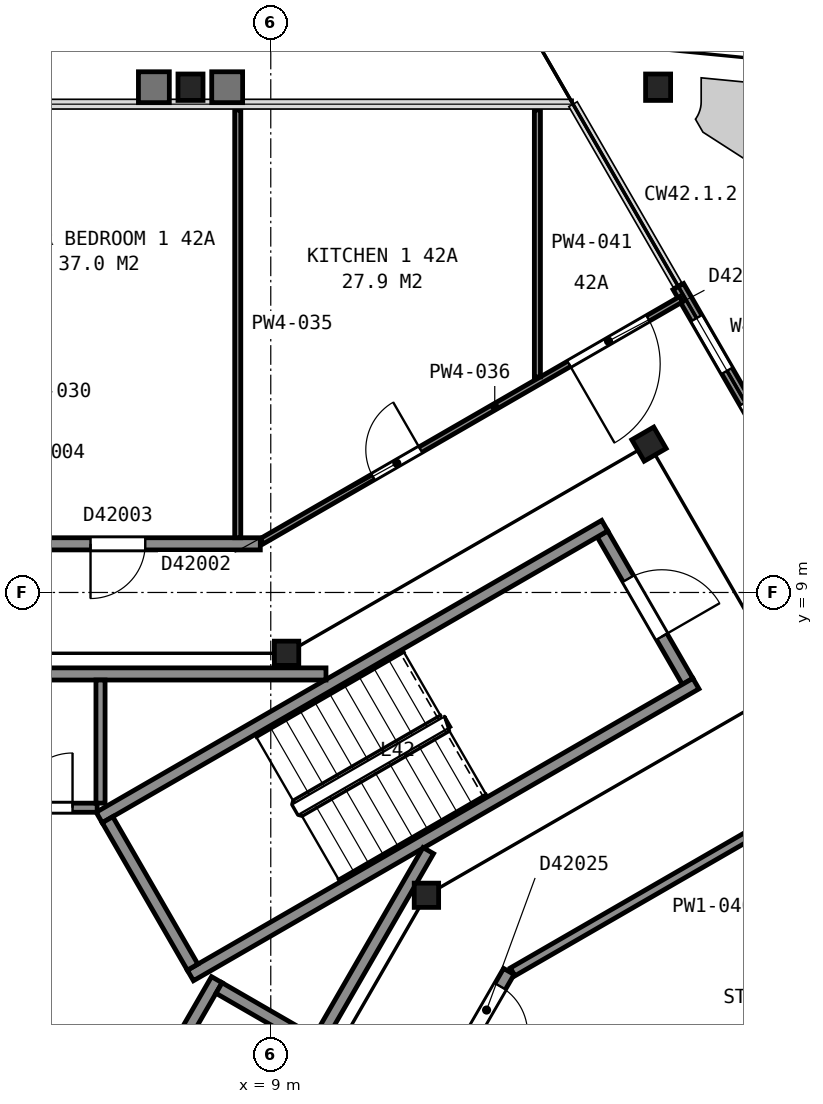
"""IFC4 building model, lengths in metres.
Left out: names, types, materials, properties, quantities, classifications, styles, units other than length and angle.
Written with IfcOpenShell. Run it as: python <this file> out.ifc"""

import sys

from ifc_helpers import new_model, si_unit, direction, frame, frame_2d, origin, origin_2d, place, context, subcontext, project, spatial, rectangle, i_section, extrude, element, fill, save


model = new_model("IFC4")
c1 = context("Model", 3, precision=1e-05, world=origin(), true_north=direction((0.0, 1.0)))
c2 = subcontext(c1, "Body", "Model", "MODEL_VIEW")
j1 = project(units=[si_unit("LENGTHUNIT", "METRE"), si_unit("PLANEANGLEUNIT", "RADIAN")], contexts=[c1])
p1 = place(None, origin())
s1 = spatial("IfcSite", under=j1, at=p1, CompositionType="ELEMENT")
p2 = place(p1, origin())
s2 = spatial("IfcBuilding", under=s1, at=p2, CompositionType="ELEMENT")
p3 = place(p2, frame((0.0, 0.0, 171.0)))
s3 = spatial("IfcBuildingStorey", under=s2, at=p3, CompositionType="ELEMENT", Elevation=171.0)
p4 = place(p3, frame((15.37, 17.31, 0.0), z_axis=(0.0, 0.0, 1.0), x_axis=(1.0, 0.0, 0.0)))
e1 = element("IfcColumn", 1, at=p4, inside=s3, PredefinedType="COLUMN", context=c2, shape_type="SweptSolid", body=[
    extrude(i_section(OverallWidth=0.411, OverallDepth=0.434, WebThickness=0.036, FlangeThickness=0.057, FilletRadius=0.015, at=origin_2d()), origin(), (0.0, 0.0, 1.0), 3.66),
])
p5 = place(p3, frame((7.68, 17.31, 0.0), z_axis=(0.0, 0.0, 1.0), x_axis=(1.0, 0.0, 0.0)))
e2 = element("IfcColumn", 2, at=p5, inside=s3, PredefinedType="COLUMN", context=c2, shape_type="SweptSolid", body=[
    extrude(i_section(OverallWidth=0.411, OverallDepth=0.434, WebThickness=0.036, FlangeThickness=0.057, FilletRadius=0.015, at=origin_2d()), origin(), (0.0, 0.0, 1.0), 3.665),
])
p6 = place(p3, frame((11.56, 4.02, 0.0), z_axis=(0.0, 0.0, 1.0), x_axis=(1.0, 0.0, 0.0)))
e3 = element("IfcColumn", 3, at=p6, inside=s3, PredefinedType="COLUMN", context=c2, shape_type="SweptSolid", body=[
    extrude(i_section(OverallWidth=0.401, OverallDepth=0.399, WebThickness=0.025, FlangeThickness=0.04, FilletRadius=0.015, at=origin_2d()), origin(), (0.0, 0.0, 1.0), 3.7),
])
p7 = place(p3, frame((15.22, 11.44, 0.0), z_axis=(0.0, 0.0, 1.0), x_axis=(0.5, -0.866025403784, 0.0)))
e4 = element("IfcColumn", 4, at=p7, inside=s3, PredefinedType="COLUMN", context=c2, shape_type="SweptSolid", body=[
    extrude(i_section(OverallWidth=0.406, OverallDepth=0.417, WebThickness=0.03, FlangeThickness=0.048, FilletRadius=0.015, at=origin_2d()), origin(), (0.0, 0.0, 1.0), 3.7),
])
p8 = place(p3, frame((9.26, 8.0, 0.0), z_axis=(0.0, 0.0, 1.0), x_axis=(1.0, 0.0, 0.0)))
e5 = element("IfcColumn", 5, at=p8, inside=s3, PredefinedType="COLUMN", context=c2, shape_type="SweptSolid", body=[
    extrude(i_section(OverallWidth=0.401, OverallDepth=0.399, WebThickness=0.025, FlangeThickness=0.04, FilletRadius=0.015, at=origin_2d()), origin(), (0.0, 0.0, 1.0), 3.7),
])
p9 = place(p3, frame((20.003, 6.583, 0.0), z_axis=(0.0, 0.0, 1.0), x_axis=(-0.499995216735, 0.866028165386, 0.0)))
e6 = element("IfcWall", 6, at=p9, inside=s3, PredefinedType="SOLIDWALL", context=c2, shape_type="SweptSolid", body=[
    extrude(rectangle(XDim=8.6, YDim=0.2, at=frame_2d((4.3, 0.0))), origin(), (0.0, 0.0, 1.0), 2.713),
])
p10 = place(p9, frame((0.6, 0.0, 0.9)))
e7 = element("IfcOpeningElement", 7, at=p10, cuts=e6, PredefinedType="OPENING", context=c2, shape_type="SweptSolid", body=[
    extrude(rectangle(XDim=1.0, YDim=1.5, at=frame_2d((0.5, 0.75))), frame((0.0, 0.11, 0.0), z_axis=(0.0, -1.0, 0.0), x_axis=(1.0, 0.0, 0.0)), (0.0, 0.0, 1.0), 0.22),
])
p11 = place(p9, frame((2.2, 0.0, 0.0)))
e8 = element("IfcOpeningElement", 8, at=p11, cuts=e6, PredefinedType="OPENING", context=c2, shape_type="SweptSolid", body=[
    extrude(rectangle(XDim=1.8, YDim=2.4, at=frame_2d((0.9, 1.2))), frame((0.0, 0.11, 0.0), z_axis=(0.0, -1.0, 0.0), x_axis=(1.0, 0.0, 0.0)), (0.0, 0.0, 1.0), 0.22),
])
p12 = place(p9, frame((4.6, 0.0, 0.0)))
e9 = element("IfcOpeningElement", 9, at=p12, cuts=e6, PredefinedType="OPENING", context=c2, shape_type="SweptSolid", body=[
    extrude(rectangle(XDim=1.8, YDim=2.4, at=frame_2d((0.9, 1.2))), frame((0.0, 0.11, 0.0), z_axis=(0.0, -1.0, 0.0), x_axis=(1.0, 0.0, 0.0)), (0.0, 0.0, 1.0), 0.22),
])
p13 = place(p9, frame((7.0, 0.0, 0.9)))
e10 = element("IfcOpeningElement", 10, at=p13, cuts=e6, PredefinedType="OPENING", context=c2, shape_type="SweptSolid", body=[
    extrude(rectangle(XDim=1.0, YDim=1.5, at=frame_2d((0.5, 0.75))), frame((0.0, 0.11, 0.0), z_axis=(0.0, -1.0, 0.0), x_axis=(1.0, 0.0, 0.0)), (0.0, 0.0, 1.0), 0.22),
])
p14 = place(p3, frame((15.855, 7.538, 0.0), z_axis=(0.0, 0.0, 1.0), x_axis=(-0.500049511043, 0.865996816683, 0.0)))
e11 = element("IfcWall", 11, at=p14, inside=s3, PredefinedType="PARTITIONING", context=c2, shape_type="SweptSolid", body=[
    extrude(rectangle(XDim=2.8, YDim=0.2, at=frame_2d((1.4, 0.0))), origin(), (0.0, 0.0, 1.0), 3.45),
])
p15 = place(p14, frame((0.85, 0.0, 0.0)))
e12 = element("IfcOpeningElement", 12, at=p15, cuts=e11, PredefinedType="OPENING", context=c2, shape_type="SweptSolid", body=[
    extrude(rectangle(XDim=1.1, YDim=2.1, at=frame_2d((0.55, 1.05))), frame((0.0, 0.11, 0.0), z_axis=(0.0, -1.0, 0.0), x_axis=(1.0, 0.0, 0.0)), (0.0, 0.0, 1.0), 0.22),
])
for number, where, z_axis, x_axis in (
    (13, (6.178, 5.299, 0.0), (0.0, 0.0, 1.0), (0.866, 0.5, 0.0)),
    (14, (7.678, 2.701, 0.0), (0.0, 0.0, 1.0), (0.866, 0.5, 0.0)),
):
    element("IfcWall", number, at=place(p3, frame(where, z_axis=z_axis, x_axis=x_axis)), inside=s3, PredefinedType="PARTITIONING", context=c2, shape_type="SweptSolid", body=[
        extrude(rectangle(XDim=9.6, YDim=0.2, at=frame_2d((4.8, 0.0))), origin(), (0.0, 0.0, 1.0), 3.45),
    ])
p16 = place(p3, frame((7.715, 2.838, 0.0), z_axis=(0.0, 0.0, 1.0), x_axis=(-0.500049511043, 0.865996816683, 0.0)))
e15 = element("IfcWall", 15, at=p16, inside=s3, PredefinedType="PARTITIONING", context=c2, shape_type="SweptSolid", body=[
    extrude(rectangle(XDim=2.8, YDim=0.2, at=frame_2d((1.4, 0.0))), origin(), (0.0, 0.0, 1.0), 3.45),
])
p17 = place(p3, frame((5.663, -1.612, 0.0), z_axis=(0.0, 0.0, 1.0), x_axis=(0.49998122708, 0.866036242063, 0.0)))
e16 = element("IfcWall", 16, at=p17, inside=s3, PredefinedType="PARTITIONING", context=c2, shape_type="SweptSolid", body=[
    extrude(rectangle(XDim=4.9, YDim=0.2, at=frame_2d((2.45, 0.0))), origin(), (0.0, 0.0, 1.0), 3.7),
])
p18 = place(p3, frame((9.665, 1.62, 0.0), z_axis=(0.0, 0.0, 1.0), x_axis=(-0.866002029911, 0.500040482552, 0.0)))
e17 = element("IfcWall", 17, at=p18, inside=s3, PredefinedType="PARTITIONING", context=c2, shape_type="SweptSolid", body=[
    extrude(rectangle(XDim=1.75, YDim=0.2, at=frame_2d((0.875, 0.0))), origin(), (0.0, 0.0, 1.0), 3.7),
])
p19 = place(p3, frame((-3.933, 7.66, 0.0), z_axis=(0.0, 0.0, 1.0), x_axis=(1.0, 0.0, 0.0)))
e18 = element("IfcWall", 18, at=p19, inside=s3, PredefinedType="PARTITIONING", context=c2, shape_type="SweptSolid", body=[
    extrude(rectangle(XDim=13.841, YDim=0.2, at=frame_2d((6.92, 0.0))), origin(), (0.0, 0.0, 1.0), 3.45),
])
p20 = place(p3, frame((0.925, 5.46, 0.0), z_axis=(0.0, 0.0, 1.0), x_axis=(1.0, 0.0, 0.0)))
e19 = element("IfcWall", 19, at=p20, inside=s3, PredefinedType="PARTITIONING", context=c2, shape_type="SweptSolid", body=[
    extrude(rectangle(XDim=5.22, YDim=0.15, at=frame_2d((2.61, 0.0))), origin(), (0.0, 0.0, 1.0), 3.45),
])
p21 = place(p20, frame((3.915, 0.0, 0.0)))
e20 = element("IfcOpeningElement", 20, at=p21, cuts=e19, PredefinedType="OPENING", context=c2, shape_type="SweptSolid", body=[
    extrude(rectangle(XDim=0.9, YDim=2.1, at=frame_2d((0.45, 1.05))), frame((0.0, 0.085, 0.0), z_axis=(0.0, -1.0, 0.0), x_axis=(1.0, 0.0, 0.0)), (0.0, 0.0, 1.0), 0.17),
])
p22 = place(p3, frame((6.2, 5.535, 0.0), z_axis=(0.0, 0.0, 1.0), x_axis=(0.0, 1.0, 0.0)))
e21 = element("IfcWall", 21, at=p22, inside=s3, PredefinedType="PARTITIONING", context=c2, shape_type="SweptSolid", body=[
    extrude(rectangle(XDim=2.025, YDim=0.15, at=frame_2d((1.013, 0.0))), origin(), (0.0, 0.0, 1.0), 3.45),
])
p23 = place(p3, frame((9.803, 1.658, 0.0), z_axis=(0.0, 0.0, 1.0), x_axis=(0.499943114462, 0.866058244174, 0.0)))
e22 = element("IfcWall", 22, at=p23, inside=s3, PredefinedType="PARTITIONING", context=c2, shape_type="SweptSolid", body=[
    extrude(rectangle(XDim=3.576, YDim=0.2, at=frame_2d((1.788, 0.0))), origin(), (0.0, 0.0, 1.0), 3.45),
])
p24 = place(p3, frame((-8.828, 9.8, 0.0), z_axis=(0.0, 0.0, 1.0), x_axis=(1.0, 0.0, 0.0)))
e23 = element("IfcWall", 23, at=p24, inside=s3, PredefinedType="PARTITIONING", context=c2, shape_type="SweptSolid", body=[
    extrude(rectangle(XDim=17.656, YDim=0.2, at=frame_2d((8.828, 0.0))), origin(), (0.0, 0.0, 1.0), 2.713),
])
p25 = place(p24, frame((14.864, 0.0, 0.0)))
e24 = element("IfcOpeningElement", 24, at=p25, cuts=e23, PredefinedType="OPENING", context=c2, shape_type="SweptSolid", body=[
    extrude(rectangle(XDim=0.9, YDim=2.1, at=frame_2d((0.45, 1.05))), frame((0.0, 0.11, 0.0), z_axis=(0.0, -1.0, 0.0), x_axis=(1.0, 0.0, 0.0)), (0.0, 0.0, 1.0), 0.22),
])
p26 = place(p24, frame((6.488, 0.0, 0.0)))
e25 = element("IfcOpeningElement", 25, at=p26, cuts=e23, PredefinedType="OPENING", context=c2, shape_type="SweptSolid", body=[
    extrude(rectangle(XDim=0.9, YDim=2.1, at=frame_2d((0.45, 1.05))), frame((0.0, 0.11, 0.0), z_axis=(0.0, -1.0, 0.0), x_axis=(1.0, 0.0, 0.0)), (0.0, 0.0, 1.0), 0.22),
])
p27 = place(p24, frame((2.2, 0.0, 0.0)))
e26 = element("IfcOpeningElement", 26, at=p27, cuts=e23, PredefinedType="OPENING", context=c2, shape_type="SweptSolid", body=[
    extrude(rectangle(XDim=0.9, YDim=2.1, at=frame_2d((0.45, 1.05))), frame((0.0, 0.11, 0.0), z_axis=(0.0, -1.0, 0.0), x_axis=(1.0, 0.0, 0.0)), (0.0, 0.0, 1.0), 0.22),
])
p28 = place(p3, frame((12.916, 2.767, 0.0), z_axis=(0.0, 0.0, 1.0), x_axis=(-0.499999767326, -0.866025538119, 0.0)))
e27 = element("IfcWall", 27, at=p28, inside=s3, PredefinedType="PARTITIONING", context=c2, shape_type="SweptSolid", body=[
    extrude(rectangle(XDim=17.731, YDim=0.2, at=frame_2d((8.865, 0.0))), origin(), (0.0, 0.0, 1.0), 2.713),
])
p29 = place(p28, frame((14.293, 0.0, 0.0)))
e28 = element("IfcOpeningElement", 28, at=p29, cuts=e27, PredefinedType="OPENING", context=c2, shape_type="SweptSolid", body=[
    extrude(rectangle(XDim=0.9, YDim=2.1, at=frame_2d((0.45, 1.05))), frame((0.0, 0.11, 0.0), z_axis=(0.0, -1.0, 0.0), x_axis=(1.0, 0.0, 0.0)), (0.0, 0.0, 1.0), 0.22),
])
p30 = place(p28, frame((10.622, 0.0, 0.0)))
e29 = element("IfcOpeningElement", 29, at=p30, cuts=e27, PredefinedType="OPENING", context=c2, shape_type="SweptSolid", body=[
    extrude(rectangle(XDim=0.9, YDim=2.1, at=frame_2d((0.45, 1.05))), frame((0.0, 0.11, 0.0), z_axis=(0.0, -1.0, 0.0), x_axis=(1.0, 0.0, 0.0)), (0.0, 0.0, 1.0), 0.22),
])
p31 = place(p28, frame((3.897, 0.0, 0.0)))
e30 = element("IfcOpeningElement", 30, at=p31, cuts=e27, PredefinedType="OPENING", context=c2, shape_type="SweptSolid", body=[
    extrude(rectangle(XDim=0.9, YDim=2.1, at=frame_2d((0.45, 1.05))), frame((0.0, 0.11, 0.0), z_axis=(0.0, -1.0, 0.0), x_axis=(1.0, 0.0, 0.0)), (0.0, 0.0, 1.0), 0.22),
])
p32 = place(p28, frame((0.283, 0.0, 0.0)))
e31 = element("IfcOpeningElement", 31, at=p32, cuts=e27, PredefinedType="OPENING", context=c2, shape_type="SweptSolid", body=[
    extrude(rectangle(XDim=0.9, YDim=2.1, at=frame_2d((0.45, 1.05))), frame((0.0, 0.11, 0.0), z_axis=(0.0, -1.0, 0.0), x_axis=(1.0, 0.0, 0.0)), (0.0, 0.0, 1.0), 0.22),
])
p33 = place(p3, frame((8.457, 9.9, 0.0), z_axis=(0.0, 0.0, 1.0), x_axis=(0.0, 1.0, 0.0)))
e32 = element("IfcWall", 32, at=p33, inside=s3, PredefinedType="PARTITIONING", context=c2, shape_type="SweptSolid", body=[
    extrude(rectangle(XDim=7.035, YDim=0.1, at=frame_2d((3.518, 0.0))), origin(), (0.0, 0.0, 1.0), 2.713),
])
p34 = place(p3, frame((8.852, 9.843, 0.0), z_axis=(0.0, 0.0, 1.0), x_axis=(0.866086037714, 0.499894964244, 0.0)))
e33 = element("IfcWall", 33, at=p34, inside=s3, PredefinedType="PARTITIONING", context=c2, shape_type="SweptSolid", body=[
    extrude(rectangle(XDim=7.963, YDim=0.1, at=frame_2d((3.981, 0.0))), origin(), (0.0, 0.0, 1.0), 2.713),
])
p35 = place(p34, frame((5.834, 0.0, 0.0)))
e34 = element("IfcOpeningElement", 34, at=p35, cuts=e33, PredefinedType="OPENING", context=c2, shape_type="SweptSolid", body=[
    extrude(rectangle(XDim=1.5, YDim=2.1, at=frame_2d((0.75, 1.05))), frame((0.0, 0.06, 0.0), z_axis=(0.0, -1.0, 0.0), x_axis=(1.0, 0.0, 0.0)), (0.0, 0.0, 1.0), 0.12),
])
p36 = place(p34, frame((2.115, 0.0, 0.0)))
e35 = element("IfcOpeningElement", 35, at=p36, cuts=e33, PredefinedType="OPENING", context=c2, shape_type="SweptSolid", body=[
    extrude(rectangle(XDim=0.9, YDim=2.1, at=frame_2d((0.45, 1.05))), frame((0.0, 0.06, 0.0), z_axis=(0.0, -1.0, 0.0), x_axis=(1.0, 0.0, 0.0)), (0.0, 0.0, 1.0), 0.12),
])
p37 = place(p3, frame((19.847, 6.725, 0.0), z_axis=(0.0, 0.0, 1.0), x_axis=(-0.866069747624, -0.499923186351, 0.0)))
e36 = element("IfcWall", 36, at=p37, inside=s3, PredefinedType="PARTITIONING", context=c2, shape_type="SweptSolid", body=[
    extrude(rectangle(XDim=7.931, YDim=0.15, at=frame_2d((3.966, 0.0))), origin(), (0.0, 0.0, 1.0), 2.713),
])
p38 = place(p37, frame((0.928, 0.0, 0.0)))
e37 = element("IfcOpeningElement", 37, at=p38, cuts=e36, PredefinedType="OPENING", context=c2, shape_type="SweptSolid", body=[
    extrude(rectangle(XDim=1.0, YDim=2.1, at=frame_2d((0.5, 1.05))), frame((0.0, 0.085, 0.0), z_axis=(0.0, -1.0, 0.0), x_axis=(1.0, 0.0, 0.0)), (0.0, 0.0, 1.0), 0.17),
])
p39 = place(p3, frame((13.385, 12.546, 0.0), z_axis=(0.0, 0.0, 1.0), x_axis=(0.0, 1.0, 0.0)))
e38 = element("IfcWall", 38, at=p39, inside=s3, PredefinedType="PARTITIONING", context=c2, shape_type="SweptSolid", body=[
    extrude(rectangle(XDim=4.389, YDim=0.1, at=frame_2d((2.195, 0.0))), origin(), (0.0, 0.0, 1.0), 2.713),
])
p40 = place(p13, origin())
e39 = element("IfcWindow", 39, at=p40, inside=s3, PartitioningType="SINGLE_PANEL", PredefinedType="WINDOW", context=c2, shape_type="SweptSolid", body=[
    extrude(rectangle(XDim=1.0, YDim=1.5, at=frame_2d((0.5, 0.75))), frame((0.0, 0.03, 0.0), z_axis=(0.0, -1.0, 0.0), x_axis=(1.0, 0.0, 0.0)), (0.0, 0.0, 1.0), 0.06),
])
fill(e10, e39)
p41 = place(p15, origin())
e40 = element("IfcDoor", 40, at=p41, inside=s3, OperationType="SINGLE_SWING_LEFT", PredefinedType="DOOR", context=c2, shape_type="SweptSolid", body=[
    extrude(rectangle(XDim=1.1, YDim=2.1, at=frame_2d((0.55, 1.05))), frame((0.0, 0.025, 0.0), z_axis=(0.0, -1.0, 0.0), x_axis=(1.0, 0.0, 0.0)), (0.0, 0.0, 1.0), 0.05),
])
fill(e12, e40)
p42 = place(p21, origin())
e41 = element("IfcDoor", 41, at=p42, inside=s3, OperationType="SINGLE_SWING_RIGHT", PredefinedType="DOOR", context=c2, shape_type="SweptSolid", body=[
    extrude(rectangle(XDim=0.9, YDim=2.1, at=frame_2d((0.45, 1.05))), frame((0.0, 0.025, 0.0), z_axis=(0.0, -1.0, 0.0), x_axis=(1.0, 0.0, 0.0)), (0.0, 0.0, 1.0), 0.05),
])
fill(e20, e41)
p43 = place(p25, origin())
e42 = element("IfcDoor", 42, at=p43, inside=s3, OperationType="SINGLE_SWING_LEFT", PredefinedType="DOOR", context=c2, shape_type="SweptSolid", body=[
    extrude(rectangle(XDim=0.9, YDim=2.1, at=frame_2d((0.45, 1.05))), frame((0.0, 0.025, 0.0), z_axis=(0.0, -1.0, 0.0), x_axis=(1.0, 0.0, 0.0)), (0.0, 0.0, 1.0), 0.05),
])
fill(e24, e42)
p44 = place(p32, origin())
e43 = element("IfcDoor", 43, at=p44, inside=s3, OperationType="SINGLE_SWING_RIGHT", PredefinedType="DOOR", context=c2, shape_type="SweptSolid", body=[
    extrude(rectangle(XDim=0.9, YDim=2.1, at=frame_2d((0.45, 1.05))), frame((0.0, 0.025, 0.0), z_axis=(0.0, -1.0, 0.0), x_axis=(1.0, 0.0, 0.0)), (0.0, 0.0, 1.0), 0.05),
])
fill(e31, e43)
p45 = place(p35, origin())
e44 = element("IfcDoor", 44, at=p45, inside=s3, OperationType="DOUBLE_DOOR_SINGLE_SWING", PredefinedType="DOOR", context=c2, shape_type="SweptSolid", body=[
    extrude(rectangle(XDim=1.5, YDim=2.1, at=frame_2d((0.75, 1.05))), frame((0.0, 0.025, 0.0), z_axis=(0.0, -1.0, 0.0), x_axis=(1.0, 0.0, 0.0)), (0.0, 0.0, 1.0), 0.05),
])
fill(e34, e44)
p46 = place(p36, origin())
e45 = element("IfcDoor", 45, at=p46, inside=s3, OperationType="SINGLE_SWING_RIGHT", PredefinedType="DOOR", context=c2, shape_type="SweptSolid", body=[
    extrude(rectangle(XDim=0.9, YDim=2.1, at=frame_2d((0.45, 1.05))), frame((0.0, 0.025, 0.0), z_axis=(0.0, -1.0, 0.0), x_axis=(1.0, 0.0, 0.0)), (0.0, 0.0, 1.0), 0.05),
])
fill(e35, e45)
save(model, sys.argv[1])
